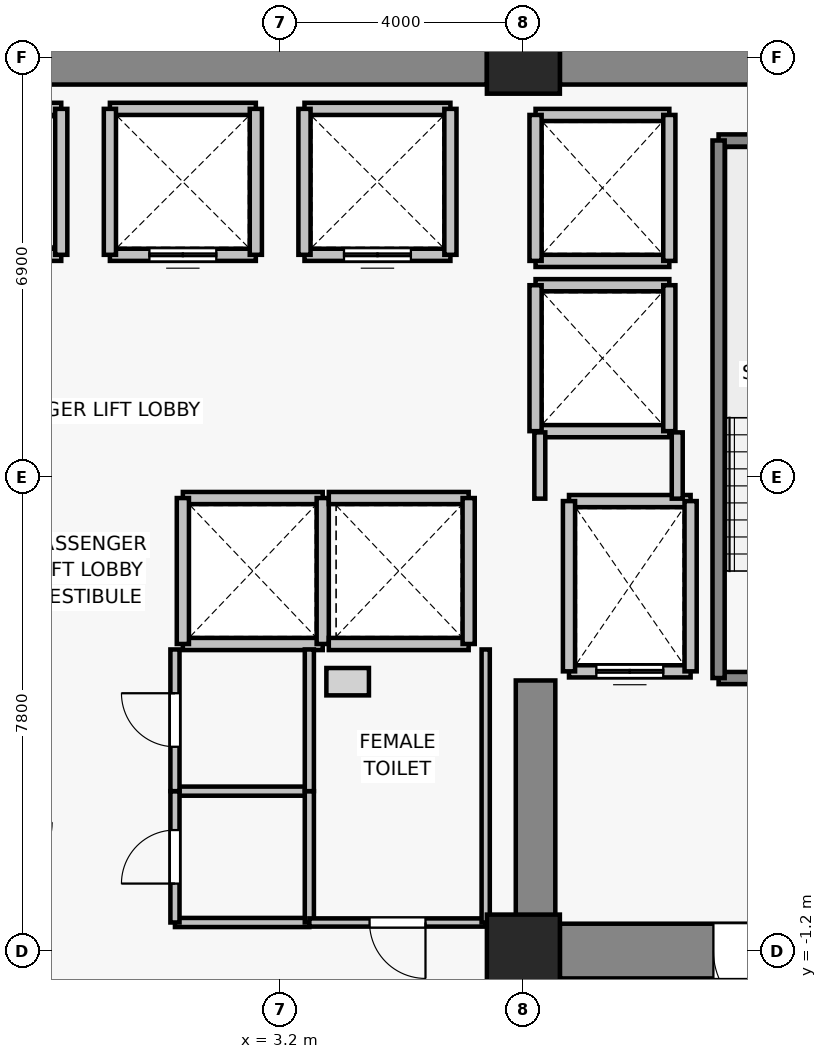
"""IFC4 building model, lengths in metres.
Left out: names, types, materials, properties, quantities, classifications, styles, units other than length and angle.
Written with IfcOpenShell. Run it as: python <this file> out.ifc"""

import sys

from ifc_helpers import new_model, si_unit, direction, frame, frame_2d, origin, origin_2d, place, context, subcontext, project, spatial, rectangle, extrude, source, transform, mapped, element, fill, save


model = new_model("IFC4")
c1 = context("Model", 3, precision=1e-05, world=origin(), true_north=direction((0.0, 1.0)))
c2 = subcontext(c1, "Body", "Model", "MODEL_VIEW")
j1 = project(units=[si_unit("LENGTHUNIT", "METRE"), si_unit("PLANEANGLEUNIT", "RADIAN")], contexts=[c1])
p1 = place(None, origin())
s1 = spatial("IfcSite", under=j1, at=p1, CompositionType="ELEMENT")
p2 = place(p1, origin())
s2 = spatial("IfcBuilding", under=s1, at=p2, CompositionType="ELEMENT")
p3 = place(p2, frame((0.0, 0.0, 27.4)))
s3 = spatial("IfcBuildingStorey", under=s2, at=p3, CompositionType="ELEMENT", Elevation=27.4)
for number, where, z_axis, x_axis in (
    (1, (7.2, -1.2, 0.0), (0.0, 0.0, 1.0), (1.0, 0.0, 0.0)),
    (2, (7.2, 13.5, 0.0), (0.0, 0.0, 1.0), (1.0, 0.0, 0.0)),
):
    element("IfcColumn", number, at=place(p3, frame(where, z_axis=z_axis, x_axis=x_axis)), inside=s3, PredefinedType="COLUMN", context=c2, shape_type="SweptSolid", body=[
        extrude(rectangle(XDim=1.2, YDim=1.2, at=origin_2d()), origin(), (0.0, 0.0, 1.0), 3.3),
    ])
p4 = place(p3, frame((-6.6, 13.5, 0.0), z_axis=(0.0, 0.0, 1.0), x_axis=(1.0, 0.0, 0.0)))
e3 = element("IfcWall", 3, at=p4, inside=s3, PredefinedType="SHEAR", context=c2, shape_type="SweptSolid", body=[
    extrude(rectangle(XDim=13.2, YDim=0.9, at=frame_2d((6.6, 0.0))), origin(), (0.0, 0.0, 1.0), 3.075),
])
p5 = place(p3, frame((7.8, 13.5, 0.0), z_axis=(0.0, 0.0, 1.0), x_axis=(1.0, 0.0, 0.0)))
e4 = element("IfcWall", 4, at=p5, inside=s3, PredefinedType="SHEAR", context=c2, shape_type="SweptSolid", body=[
    extrude(rectangle(XDim=6.0, YDim=0.9, at=frame_2d((3.0, 0.0))), origin(), (0.0, 0.0, 1.0), 3.075),
])
p6 = place(p3, frame((13.8, -1.2, 0.0), z_axis=(0.0, 0.0, 1.0), x_axis=(-1.0, 0.0, 0.0)))
e5 = element("IfcWall", 5, at=p6, inside=s3, PredefinedType="SHEAR", context=c2, shape_type="SweptSolid", body=[
    extrude(rectangle(XDim=6.0, YDim=0.9, at=frame_2d((3.0, 0.0))), origin(), (0.0, 0.0, 1.0), 3.075),
])
p7 = place(p6, frame((2.325, 0.0, 0.0)))
e6 = element("IfcOpeningElement", 6, at=p7, cuts=e5, PredefinedType="OPENING", context=c2, shape_type="SweptSolid", body=[
    extrude(rectangle(XDim=1.15, YDim=2.15, at=frame_2d((0.575, 1.075))), frame((0.0, 0.46, 0.0), z_axis=(0.0, -1.0, 0.0), x_axis=(1.0, 0.0, 0.0)), (0.0, 0.0, 1.0), 0.92),
])
p8 = place(p3, frame((7.4, -0.75, 0.0), z_axis=(0.0, 0.0, 1.0), x_axis=(0.0, 1.0, 0.0)))
e7 = element("IfcWall", 7, at=p8, inside=s3, PredefinedType="SHEAR", context=c2, shape_type="SweptSolid", body=[
    extrude(rectangle(XDim=4.0, YDim=0.65, at=frame_2d((2.0, 0.0))), origin(), (0.0, 0.0, 1.0), 3.075),
])
p9 = place(p3, frame((9.95, 3.4, 0.0), z_axis=(0.0, 0.0, 1.0), x_axis=(-1.0, 0.0, 0.0)))
e8 = element("IfcWall", 8, at=p9, inside=s3, PredefinedType="SOLIDWALL", context=c2, shape_type="SweptSolid", body=[
    extrude(rectangle(XDim=2.0, YDim=0.2, at=frame_2d((1.0, 0.0))), origin(), (0.0, 0.0, 1.0), 3.075),
])
p10 = place(p9, frame((0.45, 0.0, 0.0)))
e9 = element("IfcOpeningElement", 9, at=p10, cuts=e8, PredefinedType="OPENING", context=c2, shape_type="SweptSolid", body=[
    extrude(rectangle(XDim=1.1, YDim=2.2, at=frame_2d((0.55, 1.1))), frame((0.0, 0.11, 0.0), z_axis=(0.0, -1.0, 0.0), x_axis=(1.0, 0.0, 0.0)), (0.0, 0.0, 1.0), 0.22),
])
p11 = place(p3, frame((7.95, 6.2, 0.0), z_axis=(0.0, 0.0, 1.0), x_axis=(1.0, 0.0, 0.0)))
e10 = element("IfcWall", 10, at=p11, inside=s3, PredefinedType="SOLIDWALL", context=c2, shape_type="SweptSolid", body=[
    extrude(rectangle(XDim=2.0, YDim=0.2, at=frame_2d((1.0, 0.0))), origin(), (0.0, 0.0, 1.0), 3.075),
])
for number, where, z_axis, x_axis in (
    (11, (7.95, 3.4, 0.0), (0.0, 0.0, 1.0), (0.0, 1.0, 0.0)),
    (12, (9.95, 6.2, 0.0), (0.0, 0.0, 1.0), (0.0, -1.0, 0.0)),
):
    element("IfcWall", number, at=place(p3, frame(where, z_axis=z_axis, x_axis=x_axis)), inside=s3, PredefinedType="SOLIDWALL", context=c2, shape_type="SweptSolid", body=[
        extrude(rectangle(XDim=2.8, YDim=0.2, at=frame_2d((1.4, 0.0))), origin(), (0.0, 0.0, 1.0), 3.075),
    ])
p12 = place(p3, frame((-0.4, 10.25, 0.0), z_axis=(0.0, 0.0, 1.0), x_axis=(-1.0, 0.0, 0.0)))
e13 = element("IfcWall", 13, at=p12, inside=s3, PredefinedType="SOLIDWALL", context=c2, shape_type="SweptSolid", body=[
    extrude(rectangle(XDim=2.4, YDim=0.2, at=frame_2d((1.2, 0.0))), origin(), (0.0, 0.0, 1.0), 3.075),
])
p13 = place(p12, frame((0.65, 0.0, 0.0)))
e14 = element("IfcOpeningElement", 14, at=p13, cuts=e13, PredefinedType="OPENING", context=c2, shape_type="SweptSolid", body=[
    extrude(rectangle(XDim=1.1, YDim=2.2, at=frame_2d((0.55, 1.1))), frame((0.0, 0.11, 0.0), z_axis=(0.0, -1.0, 0.0), x_axis=(1.0, 0.0, 0.0)), (0.0, 0.0, 1.0), 0.22),
])
p14 = place(p3, frame((-2.8, 12.65, 0.0), z_axis=(0.0, 0.0, 1.0), x_axis=(1.0, 0.0, 0.0)))
e15 = element("IfcWall", 15, at=p14, inside=s3, PredefinedType="SOLIDWALL", context=c2, shape_type="SweptSolid", body=[
    extrude(rectangle(XDim=2.4, YDim=0.2, at=frame_2d((1.2, 0.0))), origin(), (0.0, 0.0, 1.0), 3.075),
])
p15 = place(p3, frame((-0.4, 12.65, 0.0), z_axis=(0.0, 0.0, 1.0), x_axis=(0.0, -1.0, 0.0)))
e16 = element("IfcWall", 16, at=p15, inside=s3, PredefinedType="SOLIDWALL", context=c2, shape_type="SweptSolid", body=[
    extrude(rectangle(XDim=2.4, YDim=0.2, at=frame_2d((1.2, 0.0))), origin(), (0.0, 0.0, 1.0), 3.075),
])
p16 = place(p3, frame((2.8, 10.25, 0.0), z_axis=(0.0, 0.0, 1.0), x_axis=(-1.0, 0.0, 0.0)))
e17 = element("IfcWall", 17, at=p16, inside=s3, PredefinedType="SOLIDWALL", context=c2, shape_type="SweptSolid", body=[
    extrude(rectangle(XDim=2.4, YDim=0.2, at=frame_2d((1.2, 0.0))), origin(), (0.0, 0.0, 1.0), 3.075),
])
p17 = place(p16, frame((0.65, 0.0, 0.0)))
e18 = element("IfcOpeningElement", 18, at=p17, cuts=e17, PredefinedType="OPENING", context=c2, shape_type="SweptSolid", body=[
    extrude(rectangle(XDim=1.1, YDim=2.2, at=frame_2d((0.55, 1.1))), frame((0.0, 0.11, 0.0), z_axis=(0.0, -1.0, 0.0), x_axis=(1.0, 0.0, 0.0)), (0.0, 0.0, 1.0), 0.22),
])
p18 = place(p3, frame((0.4, 12.65, 0.0), z_axis=(0.0, 0.0, 1.0), x_axis=(1.0, 0.0, 0.0)))
e19 = element("IfcWall", 19, at=p18, inside=s3, PredefinedType="SOLIDWALL", context=c2, shape_type="SweptSolid", body=[
    extrude(rectangle(XDim=2.4, YDim=0.2, at=frame_2d((1.2, 0.0))), origin(), (0.0, 0.0, 1.0), 3.075),
])
for number, where, z_axis, x_axis in (
    (20, (0.4, 10.25, 0.0), (0.0, 0.0, 1.0), (0.0, 1.0, 0.0)),
    (21, (2.8, 12.65, 0.0), (0.0, 0.0, 1.0), (0.0, -1.0, 0.0)),
):
    element("IfcWall", number, at=place(p3, frame(where, z_axis=z_axis, x_axis=x_axis)), inside=s3, PredefinedType="SOLIDWALL", context=c2, shape_type="SweptSolid", body=[
        extrude(rectangle(XDim=2.4, YDim=0.2, at=frame_2d((1.2, 0.0))), origin(), (0.0, 0.0, 1.0), 3.075),
    ])
p19 = place(p3, frame((6.0, 10.25, 0.0), z_axis=(0.0, 0.0, 1.0), x_axis=(-1.0, 0.0, 0.0)))
e22 = element("IfcWall", 22, at=p19, inside=s3, PredefinedType="SOLIDWALL", context=c2, shape_type="SweptSolid", body=[
    extrude(rectangle(XDim=2.4, YDim=0.2, at=frame_2d((1.2, 0.0))), origin(), (0.0, 0.0, 1.0), 3.075),
])
p20 = place(p19, frame((0.65, 0.0, 0.0)))
e23 = element("IfcOpeningElement", 23, at=p20, cuts=e22, PredefinedType="OPENING", context=c2, shape_type="SweptSolid", body=[
    extrude(rectangle(XDim=1.1, YDim=2.2, at=frame_2d((0.55, 1.1))), frame((0.0, 0.11, 0.0), z_axis=(0.0, -1.0, 0.0), x_axis=(1.0, 0.0, 0.0)), (0.0, 0.0, 1.0), 0.22),
])
for number, where, z_axis, x_axis in (
    (24, (3.6, 12.65, 0.0), (0.0, 0.0, 1.0), (1.0, 0.0, 0.0)),
    (25, (3.6, 10.25, 0.0), (0.0, 0.0, 1.0), (0.0, 1.0, 0.0)),
    (26, (6.0, 12.65, 0.0), (0.0, 0.0, 1.0), (0.0, -1.0, 0.0)),
):
    element("IfcWall", number, at=place(p3, frame(where, z_axis=z_axis, x_axis=x_axis)), inside=s3, PredefinedType="SOLIDWALL", context=c2, shape_type="SweptSolid", body=[
        extrude(rectangle(XDim=2.4, YDim=0.2, at=frame_2d((1.2, 0.0))), origin(), (0.0, 0.0, 1.0), 3.075),
    ])
for number, where, z_axis, x_axis in (
    (27, (3.9, 3.85, 0.0), (0.0, 0.0, 1.0), (-1.0, 0.0, 0.0)),
    (28, (1.6, 6.25, 0.0), (0.0, 0.0, 1.0), (1.0, 0.0, 0.0)),
):
    element("IfcWall", number, at=place(p3, frame(where, z_axis=z_axis, x_axis=x_axis)), inside=s3, PredefinedType="SOLIDWALL", context=c2, shape_type="SweptSolid", body=[
        extrude(rectangle(XDim=2.3, YDim=0.2, at=frame_2d((1.15, 0.0))), origin(), (0.0, 0.0, 1.0), 3.075),
    ])
for number, where, z_axis, x_axis in (
    (29, (1.6, 3.85, 0.0), (0.0, 0.0, 1.0), (0.0, 1.0, 0.0)),
    (30, (3.9, 6.25, 0.0), (0.0, 0.0, 1.0), (0.0, -1.0, 0.0)),
):
    element("IfcWall", number, at=place(p3, frame(where, z_axis=z_axis, x_axis=x_axis)), inside=s3, PredefinedType="SOLIDWALL", context=c2, shape_type="SweptSolid", body=[
        extrude(rectangle(XDim=2.4, YDim=0.2, at=frame_2d((1.2, 0.0))), origin(), (0.0, 0.0, 1.0), 3.075),
    ])
for number, where, z_axis, x_axis in (
    (31, (6.3, 3.85, 0.0), (0.0, 0.0, 1.0), (-1.0, 0.0, 0.0)),
    (32, (4.0, 6.25, 0.0), (0.0, 0.0, 1.0), (1.0, 0.0, 0.0)),
):
    element("IfcWall", number, at=place(p3, frame(where, z_axis=z_axis, x_axis=x_axis)), inside=s3, PredefinedType="SOLIDWALL", context=c2, shape_type="SweptSolid", body=[
        extrude(rectangle(XDim=2.3, YDim=0.2, at=frame_2d((1.15, 0.0))), origin(), (0.0, 0.0, 1.0), 3.075),
    ])
p21 = place(p3, frame((6.3, 6.25, 0.0), z_axis=(0.0, 0.0, 1.0), x_axis=(0.0, -1.0, 0.0)))
e33 = element("IfcWall", 33, at=p21, inside=s3, PredefinedType="SOLIDWALL", context=c2, shape_type="SweptSolid", body=[
    extrude(rectangle(XDim=2.4, YDim=0.2, at=frame_2d((1.2, 0.0))), origin(), (0.0, 0.0, 1.0), 3.075),
])
for number, where, z_axis, x_axis in (
    (34, (9.6, 7.35, 0.0), (0.0, 0.0, 1.0), (-1.0, 0.0, 0.0)),
    (35, (7.4, 9.75, 0.0), (0.0, 0.0, 1.0), (1.0, 0.0, 0.0)),
):
    element("IfcWall", number, at=place(p3, frame(where, z_axis=z_axis, x_axis=x_axis)), inside=s3, PredefinedType="SOLIDWALL", context=c2, shape_type="SweptSolid", body=[
        extrude(rectangle(XDim=2.2, YDim=0.2, at=frame_2d((1.1, 0.0))), origin(), (0.0, 0.0, 1.0), 2.465),
    ])
p22 = place(p3, frame((7.4, 7.35, 0.0), z_axis=(0.0, 0.0, 1.0), x_axis=(0.0, 1.0, 0.0)))
e36 = element("IfcWall", 36, at=p22, inside=s3, PredefinedType="SOLIDWALL", context=c2, shape_type="SweptSolid", body=[
    extrude(rectangle(XDim=2.4, YDim=0.2, at=frame_2d((1.2, 0.0))), origin(), (0.0, 0.0, 1.0), 2.465),
])
p23 = place(p3, frame((9.6, 9.75, 0.0), z_axis=(0.0, 0.0, 1.0), x_axis=(0.0, -1.0, 0.0)))
e37 = element("IfcWall", 37, at=p23, inside=s3, PredefinedType="SOLIDWALL", context=c2, shape_type="SweptSolid", body=[
    extrude(rectangle(XDim=2.4, YDim=0.2, at=frame_2d((1.2, 0.0))), origin(), (0.0, 0.0, 1.0), 3.075),
])
for number, where, z_axis, x_axis in (
    (38, (9.6, 10.15, 0.0), (0.0, 0.0, 1.0), (-1.0, 0.0, 0.0)),
    (39, (7.4, 12.55, 0.0), (0.0, 0.0, 1.0), (1.0, 0.0, 0.0)),
):
    element("IfcWall", number, at=place(p3, frame(where, z_axis=z_axis, x_axis=x_axis)), inside=s3, PredefinedType="SOLIDWALL", context=c2, shape_type="SweptSolid", body=[
        extrude(rectangle(XDim=2.2, YDim=0.2, at=frame_2d((1.1, 0.0))), origin(), (0.0, 0.0, 1.0), 2.465),
    ])
p24 = place(p3, frame((7.4, 10.15, 0.0), z_axis=(0.0, 0.0, 1.0), x_axis=(0.0, 1.0, 0.0)))
e40 = element("IfcWall", 40, at=p24, inside=s3, PredefinedType="SOLIDWALL", context=c2, shape_type="SweptSolid", body=[
    extrude(rectangle(XDim=2.4, YDim=0.2, at=frame_2d((1.2, 0.0))), origin(), (0.0, 0.0, 1.0), 2.465),
])
p25 = place(p3, frame((9.6, 12.55, 0.0), z_axis=(0.0, 0.0, 1.0), x_axis=(0.0, -1.0, 0.0)))
e41 = element("IfcWall", 41, at=p25, inside=s3, PredefinedType="SOLIDWALL", context=c2, shape_type="SweptSolid", body=[
    extrude(rectangle(XDim=2.4, YDim=0.2, at=frame_2d((1.2, 0.0))), origin(), (0.0, 0.0, 1.0), 3.075),
])
p26 = place(p3, frame((13.93, 3.29, 0.0), z_axis=(0.0, 0.0, 1.0), x_axis=(-1.0, 0.0, 0.0)))
e42 = element("IfcWall", 42, at=p26, inside=s3, PredefinedType="SOLIDWALL", context=c2, shape_type="SweptSolid", body=[
    extrude(rectangle(XDim=3.52, YDim=0.2, at=frame_2d((1.76, 0.0))), origin(), (0.0, 0.0, 1.0), 3.075),
])
p27 = place(p26, frame((1.205, 0.0, 0.0)))
e43 = element("IfcOpeningElement", 43, at=p27, cuts=e42, PredefinedType="OPENING", context=c2, shape_type="SweptSolid", body=[
    extrude(rectangle(XDim=1.15, YDim=2.15, at=frame_2d((0.575, 1.075))), frame((0.0, 0.11, 0.0), z_axis=(0.0, -1.0, 0.0), x_axis=(1.0, 0.0, 0.0)), (0.0, 0.0, 1.0), 0.22),
])
p28 = place(p3, frame((10.41, 12.13, 0.0), z_axis=(0.0, 0.0, 1.0), x_axis=(1.0, 0.0, 0.0)))
e44 = element("IfcWall", 44, at=p28, inside=s3, PredefinedType="SOLIDWALL", context=c2, shape_type="SweptSolid", body=[
    extrude(rectangle(XDim=3.52, YDim=0.2, at=frame_2d((1.76, 0.0))), origin(), (0.0, 0.0, 1.0), 3.075),
])
p29 = place(p3, frame((10.41, 3.29, 0.0), z_axis=(0.0, 0.0, 1.0), x_axis=(0.0, 1.0, 0.0)))
e45 = element("IfcWall", 45, at=p29, inside=s3, PredefinedType="SOLIDWALL", context=c2, shape_type="SweptSolid", body=[
    extrude(rectangle(XDim=8.84, YDim=0.2, at=frame_2d((4.42, 0.0))), origin(), (0.0, 0.0, 1.0), 3.075),
])
p30 = place(p3, frame((7.47, 6.24, 0.0), z_axis=(0.0, 0.0, 1.0), x_axis=(0.0, 1.0, 0.0)))
e46 = element("IfcWall", 46, at=p30, inside=s3, PredefinedType="PARTITIONING", context=c2, shape_type="SweptSolid", body=[
    extrude(rectangle(XDim=1.09, YDim=0.18, at=frame_2d((0.545, 0.0))), origin(), (0.0, 0.0, 1.0), 2.465),
])
p31 = place(p3, frame((9.73, 7.33, 0.0), z_axis=(0.0, 0.0, 1.0), x_axis=(0.0, -1.0, 0.0)))
e47 = element("IfcWall", 47, at=p31, inside=s3, PredefinedType="PARTITIONING", context=c2, shape_type="SweptSolid", body=[
    extrude(rectangle(XDim=1.09, YDim=0.18, at=frame_2d((0.545, 0.0))), origin(), (0.0, 0.0, 1.0), 3.075),
])
for number, where, z_axis, x_axis in (
    (48, (3.68, -0.73, 0.0), (0.0, 0.0, 1.0), (-1.0, 0.0, 0.0)),
    (49, (1.47, 1.43, 0.0), (0.0, 0.0, 1.0), (1.0, 0.0, 0.0)),
):
    element("IfcWall", number, at=place(p3, frame(where, z_axis=z_axis, x_axis=x_axis)), inside=s3, PredefinedType="PARTITIONING", context=c2, shape_type="SweptSolid", body=[
        extrude(rectangle(XDim=2.21, YDim=0.15, at=frame_2d((1.105, 0.0))), origin(), (0.0, 0.0, 1.0), 3.075),
    ])
p32 = place(p3, frame((1.47, -0.73, 0.0), z_axis=(0.0, 0.0, 1.0), x_axis=(0.0, 1.0, 0.0)))
e50 = element("IfcWall", 50, at=p32, inside=s3, PredefinedType="PARTITIONING", context=c2, shape_type="SweptSolid", body=[
    extrude(rectangle(XDim=2.16, YDim=0.15, at=frame_2d((1.08, 0.0))), origin(), (0.0, 0.0, 1.0), 3.075),
])
p33 = place(p32, frame((0.64, 0.0, 0.0)))
e51 = element("IfcOpeningElement", 51, at=p33, cuts=e50, PredefinedType="OPENING", context=c2, shape_type="SweptSolid", body=[
    extrude(rectangle(XDim=0.88, YDim=2.1, at=frame_2d((0.44, 1.05))), frame((0.0, 0.085, 0.0), z_axis=(0.0, -1.0, 0.0), x_axis=(1.0, 0.0, 0.0)), (0.0, 0.0, 1.0), 0.17),
])
p34 = place(p3, frame((3.68, 1.43, 0.0), z_axis=(0.0, 0.0, 1.0), x_axis=(0.0, -1.0, 0.0)))
e52 = element("IfcWall", 52, at=p34, inside=s3, PredefinedType="PARTITIONING", context=c2, shape_type="SweptSolid", body=[
    extrude(rectangle(XDim=2.16, YDim=0.15, at=frame_2d((1.08, 0.0))), origin(), (0.0, 0.0, 1.0), 3.075),
])
p35 = place(p3, frame((1.47, 1.43, 0.0), z_axis=(0.0, 0.0, 1.0), x_axis=(0.0, 1.0, 0.0)))
e53 = element("IfcWall", 53, at=p35, inside=s3, PredefinedType="PARTITIONING", context=c2, shape_type="SweptSolid", body=[
    extrude(rectangle(XDim=2.33, YDim=0.15, at=frame_2d((1.165, 0.0))), origin(), (0.0, 0.0, 1.0), 3.075),
])
p36 = place(p35, frame((0.73, 0.0, 0.0)))
e54 = element("IfcOpeningElement", 54, at=p36, cuts=e53, PredefinedType="OPENING", context=c2, shape_type="SweptSolid", body=[
    extrude(rectangle(XDim=0.88, YDim=2.15, at=frame_2d((0.44, 1.075))), frame((0.0, 0.085, 0.0), z_axis=(0.0, -1.0, 0.0), x_axis=(1.0, 0.0, 0.0)), (0.0, 0.0, 1.0), 0.17),
])
p37 = place(p3, frame((3.68, 3.76, 0.0), z_axis=(0.0, 0.0, 1.0), x_axis=(0.0, -1.0, 0.0)))
e55 = element("IfcWall", 55, at=p37, inside=s3, PredefinedType="PARTITIONING", context=c2, shape_type="SweptSolid", body=[
    extrude(rectangle(XDim=2.33, YDim=0.15, at=frame_2d((1.165, 0.0))), origin(), (0.0, 0.0, 1.0), 3.075),
])
p38 = place(p3, frame((6.58, -0.73, 0.0), z_axis=(0.0, 0.0, 1.0), x_axis=(-1.0, 0.0, 0.0)))
e56 = element("IfcWall", 56, at=p38, inside=s3, PredefinedType="PARTITIONING", context=c2, shape_type="SweptSolid", body=[
    extrude(rectangle(XDim=2.9, YDim=0.135, at=frame_2d((1.45, 0.0))), origin(), (0.0, 0.0, 1.0), 3.075),
])
p39 = place(p38, frame((0.99, 0.0, 0.0)))
e57 = element("IfcOpeningElement", 57, at=p39, cuts=e56, PredefinedType="OPENING", context=c2, shape_type="SweptSolid", body=[
    extrude(rectangle(XDim=0.92, YDim=2.1, at=frame_2d((0.46, 1.05))), frame((0.0, 0.077, 0.0), z_axis=(0.0, -1.0, 0.0), x_axis=(1.0, 0.0, 0.0)), (0.0, 0.0, 1.0), 0.155),
])
p40 = place(p3, frame((6.58, 3.76, 0.0), z_axis=(0.0, 0.0, 1.0), x_axis=(0.0, -1.0, 0.0)))
e58 = element("IfcWall", 58, at=p40, inside=s3, PredefinedType="PARTITIONING", context=c2, shape_type="SweptSolid", body=[
    extrude(rectangle(XDim=4.49, YDim=0.135, at=frame_2d((2.245, 0.0))), origin(), (0.0, 0.0, 1.0), 3.075),
])
m1 = source(origin(), c2, "Body", "SweptSolid", [
    extrude(rectangle(XDim=1.1, YDim=2.2, at=frame_2d((0.55, 1.1))), frame((0.0, 0.025, 0.0), z_axis=(0.0, -1.0, 0.0), x_axis=(1.0, 0.0, 0.0)), (0.0, 0.0, 1.0), 0.05),
])
p41 = place(p10, origin())
e59 = element("IfcDoor", 59, at=p41, inside=s3, OperationType="DOUBLE_DOOR_SLIDING", PredefinedType="DOOR", context=c2, shape_type="MappedRepresentation", body=[
    mapped(m1, transform((0.0, 0.0, 0.0), x_axis=(1.0, 0.0, 0.0), y_axis=(0.0, 1.0, 0.0), z_axis=(0.0, 0.0, 1.0), scale=1.0)),
])
fill(e9, e59)
p42 = place(p17, origin())
e60 = element("IfcDoor", 60, at=p42, inside=s3, OperationType="DOUBLE_DOOR_SLIDING", PredefinedType="DOOR", context=c2, shape_type="MappedRepresentation", body=[
    mapped(m1, transform((0.0, 0.0, 0.0), x_axis=(1.0, 0.0, 0.0), y_axis=(0.0, 1.0, 0.0), z_axis=(0.0, 0.0, 1.0), scale=1.0)),
])
fill(e18, e60)
p43 = place(p20, origin())
e61 = element("IfcDoor", 61, at=p43, inside=s3, OperationType="DOUBLE_DOOR_SLIDING", PredefinedType="DOOR", context=c2, shape_type="MappedRepresentation", body=[
    mapped(m1, transform((0.0, 0.0, 0.0), x_axis=(1.0, 0.0, 0.0), y_axis=(0.0, 1.0, 0.0), z_axis=(0.0, 0.0, 1.0), scale=1.0)),
])
fill(e23, e61)
m2 = source(origin(), c2, "Body", "SweptSolid", [
    extrude(rectangle(XDim=1.15, YDim=2.15, at=frame_2d((0.575, 1.075))), frame((0.0, 0.025, 0.0), z_axis=(0.0, -1.0, 0.0), x_axis=(1.0, 0.0, 0.0)), (0.0, 0.0, 1.0), 0.05),
])
p44 = place(p7, origin())
e62 = element("IfcDoor", 62, at=p44, inside=s3, OperationType="SINGLE_SWING_LEFT", PredefinedType="DOOR", context=c2, shape_type="MappedRepresentation", body=[
    mapped(m2, transform((0.0, 0.0, 0.0), x_axis=(1.0, 0.0, 0.0), y_axis=(0.0, 1.0, 0.0), z_axis=(0.0, 0.0, 1.0), scale=1.0)),
])
fill(e6, e62)
m3 = source(origin(), c2, "Body", "SweptSolid", [
    extrude(rectangle(XDim=0.88, YDim=2.1, at=frame_2d((0.44, 1.05))), frame((0.0, 0.025, 0.0), z_axis=(0.0, -1.0, 0.0), x_axis=(1.0, 0.0, 0.0)), (0.0, 0.0, 1.0), 0.05),
])
p45 = place(p33, origin())
e63 = element("IfcDoor", 63, at=p45, inside=s3, OperationType="SINGLE_SWING_LEFT", PredefinedType="DOOR", context=c2, shape_type="MappedRepresentation", body=[
    mapped(m3, transform((0.0, 0.0, 0.0), x_axis=(1.0, 0.0, 0.0), y_axis=(0.0, 1.0, 0.0), z_axis=(0.0, 0.0, 1.0), scale=1.0)),
])
fill(e51, e63)
m4 = source(origin(), c2, "Body", "SweptSolid", [
    extrude(rectangle(XDim=0.88, YDim=2.15, at=frame_2d((0.44, 1.075))), frame((0.0, 0.025, 0.0), z_axis=(0.0, -1.0, 0.0), x_axis=(1.0, 0.0, 0.0)), (0.0, 0.0, 1.0), 0.05),
])
p46 = place(p36, origin())
e64 = element("IfcDoor", 64, at=p46, inside=s3, OperationType="SINGLE_SWING_RIGHT", PredefinedType="DOOR", context=c2, shape_type="MappedRepresentation", body=[
    mapped(m4, transform((0.0, 0.0, 0.0), x_axis=(1.0, 0.0, 0.0), y_axis=(0.0, 1.0, 0.0), z_axis=(0.0, 0.0, 1.0), scale=1.0)),
])
fill(e54, e64)
m5 = source(origin(), c2, "Body", "SweptSolid", [
    extrude(rectangle(XDim=0.92, YDim=2.1, at=frame_2d((0.46, 1.05))), frame((0.0, 0.025, 0.0), z_axis=(0.0, -1.0, 0.0), x_axis=(1.0, 0.0, 0.0)), (0.0, 0.0, 1.0), 0.05),
])
p47 = place(p39, origin())
e65 = element("IfcDoor", 65, at=p47, inside=s3, OperationType="SINGLE_SWING_LEFT", PredefinedType="DOOR", context=c2, shape_type="MappedRepresentation", body=[
    mapped(m5, transform((0.0, 0.0, 0.0), x_axis=(1.0, 0.0, 0.0), y_axis=(0.0, 1.0, 0.0), z_axis=(0.0, 0.0, 1.0), scale=1.0)),
])
fill(e57, e65)
save(model, sys.argv[1])
